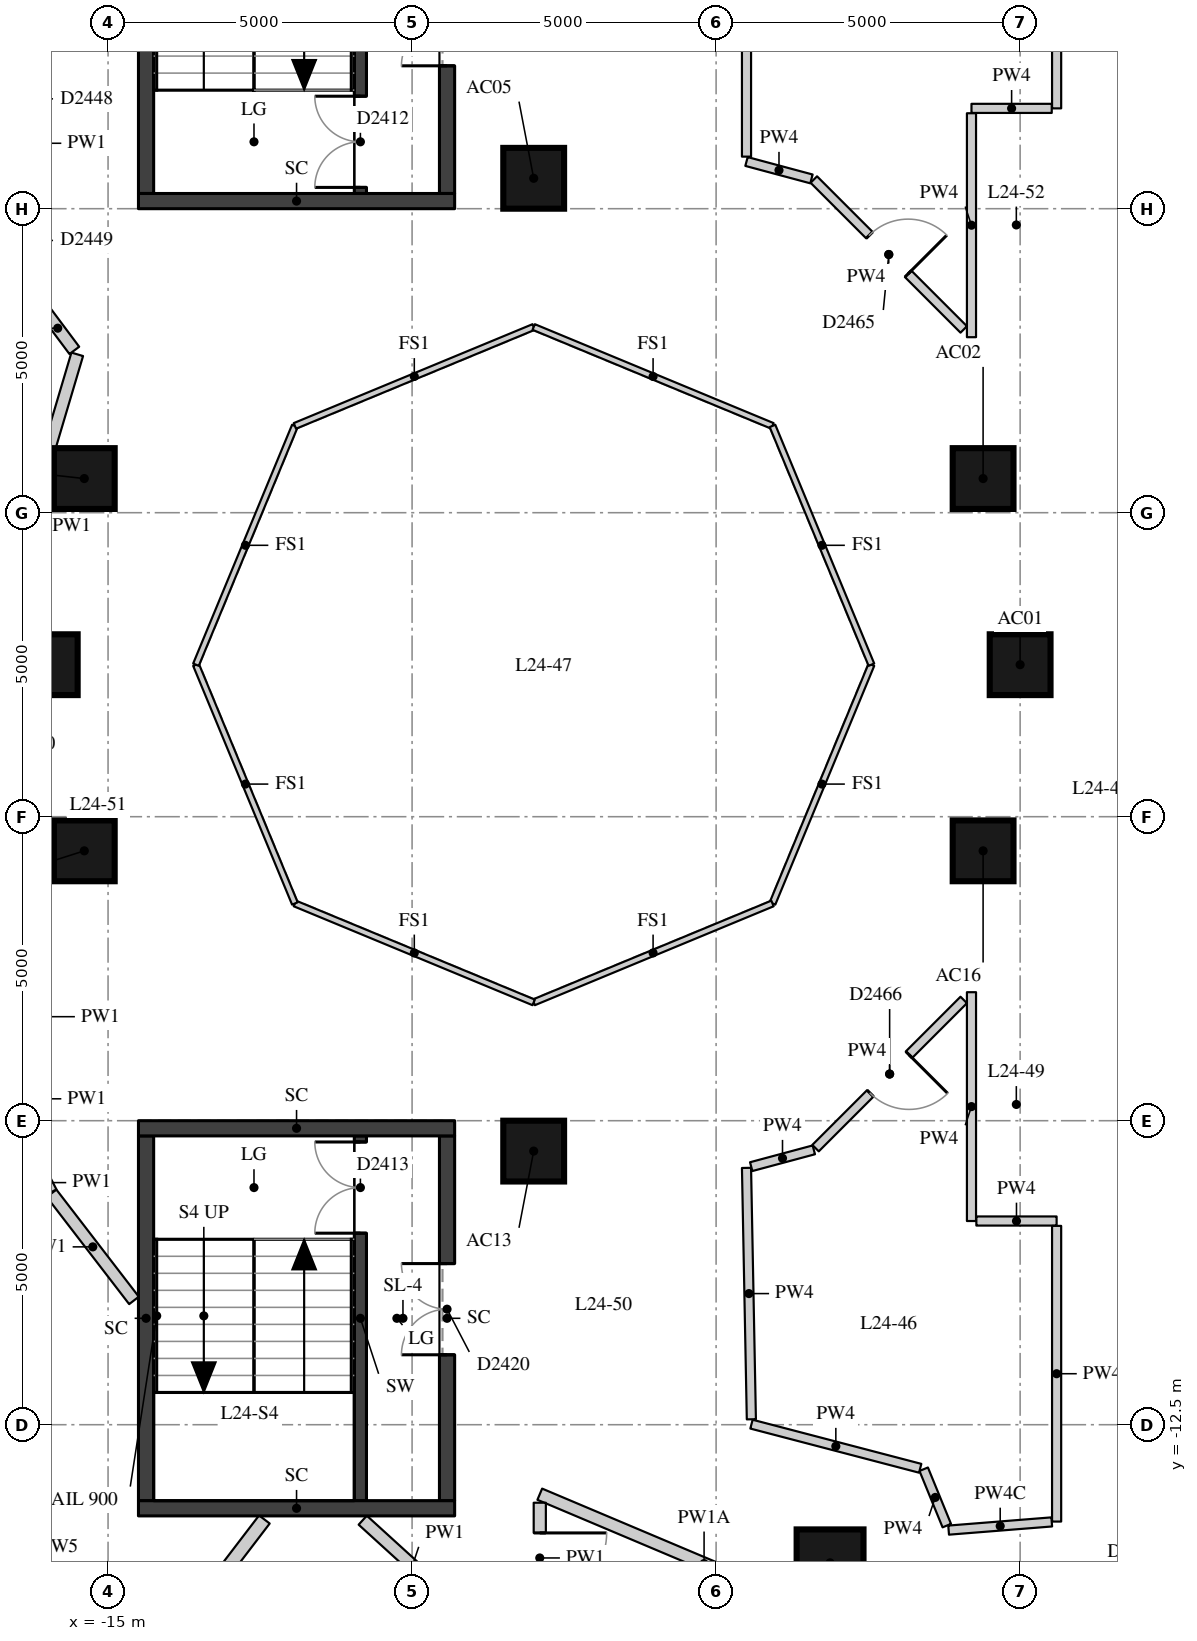
"""IFC4 building model, lengths in metres.
Left out: names, types, materials, properties, quantities, classifications, styles, units other than length and angle.
Written with IfcOpenShell. Run it as: python <this file> out.ifc"""

import sys

from ifc_helpers import new_model, si_unit, direction, frame, frame_2d, origin, origin_2d, place, context, subcontext, project, spatial, rectangle, extrude, element, fill, save


model = new_model("IFC4")
c1 = context("Model", 3, precision=1e-05, world=origin(), true_north=direction((0.0, 1.0)))
c2 = subcontext(c1, "Body", "Model", "MODEL_VIEW")
j1 = project(units=[si_unit("LENGTHUNIT", "METRE"), si_unit("PLANEANGLEUNIT", "RADIAN")], contexts=[c1])
p1 = place(None, origin())
s1 = spatial("IfcSite", under=j1, at=p1, CompositionType="ELEMENT")
p2 = place(p1, origin())
s2 = spatial("IfcBuilding", under=s1, at=p2, CompositionType="ELEMENT")
p3 = place(p2, frame((0.0, 0.0, 88.9)))
s3 = spatial("IfcBuildingStorey", under=s2, at=p3, CompositionType="ELEMENT", Elevation=88.9)
for number, where, z_axis, x_axis in (
    (1, (0.0, 0.0, 0.0), (0.0, 0.0, 1.0), (1.0, 0.0, 0.0)),
    (2, (-0.609, 3.062, 0.0), (0.0, 0.0, 1.0), (1.0, 0.0, 0.0)),
    (3, (-8.0, 8.0, 0.0), (0.0, 0.0, 1.0), (1.0, 0.0, 0.0)),
    (4, (-15.391, 3.062, 0.0), (0.0, 0.0, 1.0), (1.0, 0.0, 0.0)),
    (5, (-16.0, 0.0, 0.0), (0.0, 0.0, 1.0), (1.0, 0.0, 0.0)),
    (6, (-15.391, -3.062, 0.0), (0.0, 0.0, 1.0), (1.0, 0.0, 0.0)),
    (7, (-8.0, -8.0, 0.0), (0.0, 0.0, 1.0), (1.0, 0.0, 0.0)),
    (8, (-0.609, -3.062, 0.0), (0.0, 0.0, 1.0), (1.0, 0.0, 0.0)),
):
    element("IfcColumn", number, at=place(p3, frame(where, z_axis=z_axis, x_axis=x_axis)), inside=s3, PredefinedType="COLUMN", context=c2, shape_type="SweptSolid", body=[
        extrude(rectangle(XDim=1.0, YDim=1.0, at=origin_2d()), origin(), (0.0, 0.0, 1.0), 3.3),
    ])
p4 = place(p3, frame((-3.126, -14.772, 0.0), z_axis=(0.0, 0.0, 1.0), x_axis=(1.0, 0.0, 0.0)))
e9 = element("IfcColumn", 9, at=p4, inside=s3, PredefinedType="COLUMN", context=c2, shape_type="SweptSolid", body=[
    extrude(rectangle(XDim=1.1, YDim=1.1, at=origin_2d()), origin(), (0.0, 0.0, 1.0), 3.3),
])
p5 = place(p3, frame((-17.814, -14.491, 0.0), z_axis=(0.0, 0.0, 1.0), x_axis=(0.73951517403, -0.673139886933, 0.0)))
e10 = element("IfcWall", 10, at=p5, inside=s3, PredefinedType="SOLIDWALL", context=c2, shape_type="SweptSolid", body=[
    extrude(rectangle(XDim=4.031, YDim=0.45, at=frame_2d((2.016, 0.0))), origin(), (0.0, 0.0, 1.0), 3.02),
])
p6 = place(p5, frame((0.941, 0.0, 0.4)))
e11 = element("IfcOpeningElement", 11, at=p6, cuts=e10, PredefinedType="OPENING", context=c2, shape_type="SweptSolid", body=[
    extrude(rectangle(XDim=1.0, YDim=1.75, at=frame_2d((0.5, 0.875))), frame((0.0, 0.235, 0.0), z_axis=(0.0, -1.0, 0.0), x_axis=(1.0, 0.0, 0.0)), (0.0, 0.0, 1.0), 0.47),
])
p7 = place(p5, frame((2.091, 0.0, 0.0)))
e12 = element("IfcOpeningElement", 12, at=p7, cuts=e10, PredefinedType="OPENING", context=c2, shape_type="SweptSolid", body=[
    extrude(rectangle(XDim=1.0, YDim=2.15, at=frame_2d((0.5, 1.075))), frame((0.0, 0.235, 0.0), z_axis=(0.0, -1.0, 0.0), x_axis=(1.0, 0.0, 0.0)), (0.0, 0.0, 1.0), 0.47),
])
p8 = place(p3, frame((-10.85, 7.75, 0.0), z_axis=(0.0, 0.0, 1.0), x_axis=(0.0, 1.0, 0.0)))
e13 = element("IfcWall", 13, at=p8, inside=s3, PredefinedType="SHEAR", context=c2, shape_type="SweptSolid", body=[
    extrude(rectangle(XDim=6.0, YDim=0.2, at=frame_2d((3.0, 0.0))), origin(), (0.0, 0.0, 1.0), 3.02),
])
p9 = place(p8, frame((0.1, 0.0, 0.0)))
e14 = element("IfcOpeningElement", 14, at=p9, cuts=e13, PredefinedType="OPENING", context=c2, shape_type="SweptSolid", body=[
    extrude(rectangle(XDim=1.5, YDim=2.1, at=frame_2d((0.75, 1.05))), frame((0.0, 0.11, 0.0), z_axis=(0.0, -1.0, 0.0), x_axis=(1.0, 0.0, 0.0)), (0.0, 0.0, 1.0), 0.22),
])
p10 = place(p3, frame((-10.85, -13.75, 0.0), z_axis=(0.0, 0.0, 1.0), x_axis=(0.0, 1.0, 0.0)))
e15 = element("IfcWall", 15, at=p10, inside=s3, PredefinedType="SHEAR", context=c2, shape_type="SweptSolid", body=[
    extrude(rectangle(XDim=6.0, YDim=0.2, at=frame_2d((3.0, 0.0))), origin(), (0.0, 0.0, 1.0), 3.02),
])
p11 = place(p10, frame((4.4, 0.0, 0.0)))
e16 = element("IfcOpeningElement", 16, at=p11, cuts=e15, PredefinedType="OPENING", context=c2, shape_type="SweptSolid", body=[
    extrude(rectangle(XDim=1.5, YDim=2.1, at=frame_2d((0.75, 1.05))), frame((0.0, 0.11, 0.0), z_axis=(0.0, -1.0, 0.0), x_axis=(1.0, 0.0, 0.0)), (0.0, 0.0, 1.0), 0.22),
])
p12 = place(p3, frame((-14.375, 7.75, -0.28), z_axis=(0.0, 0.0, 1.0), x_axis=(0.0, 1.0, 0.0)))
e17 = element("IfcWall", 17, at=p12, inside=s3, PredefinedType="SHEAR", context=c2, shape_type="SweptSolid", body=[
    extrude(rectangle(XDim=6.0, YDim=0.25, at=frame_2d((3.0, 0.0))), origin(), (0.0, 0.0, 1.0), 3.3),
])
p13 = place(p3, frame((-9.425, 7.75, -0.28), z_axis=(0.0, 0.0, 1.0), x_axis=(0.0, 1.0, 0.0)))
e18 = element("IfcWall", 18, at=p13, inside=s3, PredefinedType="SHEAR", context=c2, shape_type="SweptSolid", body=[
    extrude(rectangle(XDim=6.0, YDim=0.25, at=frame_2d((3.0, 0.0))), origin(), (0.0, 0.0, 1.0), 3.3),
])
p14 = place(p13, frame((2.1, 0.0, 0.28)))
e19 = element("IfcOpeningElement", 19, at=p14, cuts=e18, PredefinedType="OPENING", context=c2, shape_type="SweptSolid", body=[
    extrude(rectangle(XDim=1.5, YDim=2.1, at=frame_2d((0.75, 1.05))), frame((0.0, 0.135, 0.0), z_axis=(0.0, -1.0, 0.0), x_axis=(1.0, 0.0, 0.0)), (0.0, 0.0, 1.0), 0.27),
])
p15 = place(p3, frame((-14.5, 7.625, -0.28), z_axis=(0.0, 0.0, 1.0), x_axis=(1.0, 0.0, 0.0)))
e20 = element("IfcWall", 20, at=p15, inside=s3, PredefinedType="SHEAR", context=c2, shape_type="SweptSolid", body=[
    extrude(rectangle(XDim=5.2, YDim=0.25, at=frame_2d((2.6, 0.0))), origin(), (0.0, 0.0, 1.0), 3.3),
])
p16 = place(p3, frame((-14.375, -13.75, -0.28), z_axis=(0.0, 0.0, 1.0), x_axis=(0.0, 1.0, 0.0)))
e21 = element("IfcWall", 21, at=p16, inside=s3, PredefinedType="SHEAR", context=c2, shape_type="SweptSolid", body=[
    extrude(rectangle(XDim=6.0, YDim=0.25, at=frame_2d((3.0, 0.0))), origin(), (0.0, 0.0, 1.0), 3.3),
])
p17 = place(p3, frame((-9.425, -13.75, -0.28), z_axis=(0.0, 0.0, 1.0), x_axis=(0.0, 1.0, 0.0)))
e22 = element("IfcWall", 22, at=p17, inside=s3, PredefinedType="SHEAR", context=c2, shape_type="SweptSolid", body=[
    extrude(rectangle(XDim=6.0, YDim=0.25, at=frame_2d((3.0, 0.0))), origin(), (0.0, 0.0, 1.0), 3.3),
])
p18 = place(p17, frame((2.4, 0.0, 0.28)))
e23 = element("IfcOpeningElement", 23, at=p18, cuts=e22, PredefinedType="OPENING", context=c2, shape_type="SweptSolid", body=[
    extrude(rectangle(XDim=1.5, YDim=2.1, at=frame_2d((0.75, 1.05))), frame((0.0, 0.135, 0.0), z_axis=(0.0, -1.0, 0.0), x_axis=(1.0, 0.0, 0.0)), (0.0, 0.0, 1.0), 0.27),
])
for number, where, z_axis, x_axis in (
    (24, (-14.5, -7.625, -0.28), (0.0, 0.0, 1.0), (1.0, 0.0, 0.0)),
    (25, (-14.5, -13.875, -0.28), (0.0, 0.0, 1.0), (1.0, 0.0, 0.0)),
):
    element("IfcWall", number, at=place(p3, frame(where, z_axis=z_axis, x_axis=x_axis)), inside=s3, PredefinedType="SHEAR", context=c2, shape_type="SweptSolid", body=[
        extrude(rectangle(XDim=5.2, YDim=0.25, at=frame_2d((2.6, 0.0))), origin(), (0.0, 0.0, 1.0), 3.3),
    ])
p19 = place(p3, frame((-14.573, -10.456, 0.0), z_axis=(0.0, 0.0, 1.0), x_axis=(-0.60967360535, 0.792652568872, 0.0)))
e26 = element("IfcWall", 26, at=p19, inside=s3, PredefinedType="PARTITIONING", context=c2, shape_type="SweptSolid", body=[
    extrude(rectangle(XDim=2.223, YDim=0.2, at=frame_2d((1.111, 0.0))), origin(), (0.0, 0.0, 1.0), 3.02),
])
p20 = place(p3, frame((-15.938, -8.676, 0.0), z_axis=(0.0, 0.0, 1.0), x_axis=(-0.456525695549, 0.889710227717, 0.0)))
e27 = element("IfcWall", 27, at=p20, inside=s3, PredefinedType="PARTITIONING", context=c2, shape_type="SweptSolid", body=[
    extrude(rectangle(XDim=0.356, YDim=0.2, at=frame_2d((0.178, 0.0))), origin(), (0.0, 0.0, 1.0), 3.02),
])
p21 = place(p3, frame((-17.189, -0.562, 0.0), z_axis=(0.0, 0.0, 1.0), x_axis=(0.28454253649, 0.95866341587, 0.0)))
e28 = element("IfcWall", 28, at=p21, inside=s3, PredefinedType="PARTITIONING", context=c2, shape_type="SweptSolid", body=[
    extrude(rectangle(XDim=5.911, YDim=0.2, at=frame_2d((2.956, 0.0))), origin(), (0.0, 0.0, 1.0), 3.02),
])
p22 = place(p3, frame((-15.555, 5.169, 0.0), z_axis=(0.0, 0.0, 1.0), x_axis=(-0.598284647233, 0.801283645712, 0.0)))
e29 = element("IfcWall", 29, at=p22, inside=s3, PredefinedType="PARTITIONING", context=c2, shape_type="SweptSolid", body=[
    extrude(rectangle(XDim=0.912, YDim=0.2, at=frame_2d((0.456, 0.0))), origin(), (0.0, 0.0, 1.0), 3.02),
])
p23 = place(p3, frame((-2.496, -15.925, 0.0), z_axis=(0.0, 0.0, 1.0), x_axis=(-0.921239287596, 0.388996368864, 0.0)))
e30 = element("IfcWall", 30, at=p23, inside=s3, PredefinedType="PARTITIONING", context=c2, shape_type="SweptSolid", body=[
    extrude(rectangle(XDim=5.866, YDim=0.2, at=frame_2d((2.933, 0.0))), origin(), (0.0, 0.0, 1.0), 2.57),
])
p24 = place(p3, frame((-7.9, -13.783, 0.0), z_axis=(0.0, 0.0, 1.0), x_axis=(0.0, -1.0, 0.0)))
e31 = element("IfcWall", 31, at=p24, inside=s3, PredefinedType="PARTITIONING", context=c2, shape_type="SweptSolid", body=[
    extrude(rectangle(XDim=1.817, YDim=0.2, at=frame_2d((0.908, 0.0))), origin(), (0.0, 0.0, 1.0), 3.02),
])
p25 = place(p24, frame((0.497, 0.0, 0.0)))
e32 = element("IfcOpeningElement", 32, at=p25, cuts=e31, PredefinedType="OPENING", context=c2, shape_type="SweptSolid", body=[
    extrude(rectangle(XDim=1.1, YDim=2.1, at=frame_2d((0.55, 1.05))), frame((0.0, 0.11, 0.0), z_axis=(0.0, -1.0, 0.0), x_axis=(1.0, 0.0, 0.0)), (0.0, 0.0, 1.0), 0.22),
])
p26 = place(p3, frame((-9.176, -15.56, 0.0), z_axis=(0.0, 0.0, 1.0), x_axis=(-0.73943556447, 0.673227336044, 0.0)))
e33 = element("IfcWall", 33, at=p26, inside=s3, PredefinedType="PARTITIONING", context=c2, shape_type="SweptSolid", body=[
    extrude(rectangle(XDim=2.212, YDim=0.2, at=frame_2d((1.106, 0.0))), origin(), (0.0, 0.0, 1.0), 3.02),
])
p27 = place(p3, frame((0.6, 13.205, 0.0), z_axis=(0.0, 0.0, 1.0), x_axis=(0.0, -1.0, 0.0)))
e34 = element("IfcWall", 34, at=p27, inside=s3, PredefinedType="PARTITIONING", context=c2, shape_type="SweptSolid", body=[
    extrude(rectangle(XDim=4.055, YDim=0.15, at=frame_2d((2.027, 0.0))), origin(), (0.0, 0.0, 1.0), 3.02),
])
p28 = place(p3, frame((0.52, 9.15, 0.0), z_axis=(0.0, 0.0, 1.0), x_axis=(-1.0, 0.0, 0.0)))
e35 = element("IfcWall", 35, at=p28, inside=s3, PredefinedType="PARTITIONING", context=c2, shape_type="SweptSolid", body=[
    extrude(rectangle(XDim=1.32, YDim=0.15, at=frame_2d((0.66, 0.0))), origin(), (0.0, 0.0, 1.0), 3.02),
])
p29 = place(p3, frame((-0.8, 9.07, 0.0), z_axis=(0.0, 0.0, 1.0), x_axis=(0.0, -1.0, 0.0)))
e36 = element("IfcWall", 36, at=p29, inside=s3, PredefinedType="PARTITIONING", context=c2, shape_type="SweptSolid", body=[
    extrude(rectangle(XDim=3.683, YDim=0.15, at=frame_2d((1.842, 0.0))), origin(), (0.0, 0.0, 1.0), 3.02),
])
p30 = place(p3, frame((-0.927, 5.514, 0.0), z_axis=(0.0, 0.0, 1.0), x_axis=(-0.707106781187, 0.707106781187, 0.0)))
e37 = element("IfcWall", 37, at=p30, inside=s3, PredefinedType="PARTITIONING", context=c2, shape_type="SweptSolid", body=[
    extrude(rectangle(XDim=3.487, YDim=0.15, at=frame_2d((1.743, 0.0))), origin(), (0.0, 0.0, 1.0), 3.02),
])
p31 = place(p30, frame((1.293, 0.0, 0.0)))
e38 = element("IfcOpeningElement", 38, at=p31, cuts=e37, PredefinedType="OPENING", context=c2, shape_type="SweptSolid", body=[
    extrude(rectangle(XDim=0.9, YDim=2.1, at=frame_2d((0.45, 1.05))), frame((0.0, 0.085, 0.0), z_axis=(0.0, -1.0, 0.0), x_axis=(1.0, 0.0, 0.0)), (0.0, 0.0, 1.0), 0.17),
])
p32 = place(p3, frame((-3.432, 7.99, 0.0), z_axis=(0.0, 0.0, 1.0), x_axis=(-0.965900750832, 0.258912609855, 0.0)))
e39 = element("IfcWall", 39, at=p32, inside=s3, PredefinedType="PARTITIONING", context=c2, shape_type="SweptSolid", body=[
    extrude(rectangle(XDim=1.106, YDim=0.15, at=frame_2d((0.553, 0.0))), origin(), (0.0, 0.0, 1.0), 3.02),
])
p33 = place(p3, frame((-4.5, 8.356, 0.0), z_axis=(0.0, 0.0, 1.0), x_axis=(0.0, 1.0, 0.0)))
e40 = element("IfcWall", 40, at=p33, inside=s3, PredefinedType="PARTITIONING", context=c2, shape_type="SweptSolid", body=[
    extrude(rectangle(XDim=3.631, YDim=0.15, at=frame_2d((1.815, 0.0))), origin(), (0.0, 0.0, 1.0), 3.02),
])
p34 = place(p3, frame((-0.8, -5.386, 0.0), z_axis=(0.0, 0.0, 1.0), x_axis=(0.0, -1.0, 0.0)))
e41 = element("IfcWall", 41, at=p34, inside=s3, PredefinedType="PARTITIONING", context=c2, shape_type="SweptSolid", body=[
    extrude(rectangle(XDim=3.763, YDim=0.15, at=frame_2d((1.882, 0.0))), origin(), (0.0, 0.0, 1.0), 3.02),
])
p35 = place(p3, frame((-0.72, -9.15, 0.0), z_axis=(0.0, 0.0, 1.0), x_axis=(1.0, 0.0, 0.0)))
e42 = element("IfcWall", 42, at=p35, inside=s3, PredefinedType="PARTITIONING", context=c2, shape_type="SweptSolid", body=[
    extrude(rectangle(XDim=1.32, YDim=0.15, at=frame_2d((0.66, 0.0))), origin(), (0.0, 0.0, 1.0), 3.02),
])
p36 = place(p3, frame((0.6, -9.23, 0.0), z_axis=(0.0, 0.0, 1.0), x_axis=(0.0, -1.0, 0.0)))
e43 = element("IfcWall", 43, at=p36, inside=s3, PredefinedType="PARTITIONING", context=c2, shape_type="SweptSolid", body=[
    extrude(rectangle(XDim=4.863, YDim=0.15, at=frame_2d((2.432, 0.0))), origin(), (0.0, 0.0, 1.0), 3.02),
])
p37 = place(p3, frame((0.52, -14.099, 0.0), z_axis=(0.0, 0.0, 1.0), x_axis=(-0.99684577893, -0.079363045745, 0.0)))
e44 = element("IfcWall", 44, at=p37, inside=s3, PredefinedType="PARTITIONING", context=c2, shape_type="SweptSolid", body=[
    extrude(rectangle(XDim=1.701, YDim=0.15, at=frame_2d((0.851, 0.0))), origin(), (0.0, 0.0, 1.0), 2.42),
])
p38 = place(p3, frame((-1.206, -14.16, 0.0), z_axis=(0.0, 0.0, 1.0), x_axis=(-0.378813066595, 0.925473209, 0.0)))
e45 = element("IfcWall", 45, at=p38, inside=s3, PredefinedType="PARTITIONING", context=c2, shape_type="SweptSolid", body=[
    extrude(rectangle(XDim=1.002, YDim=0.15, at=frame_2d((0.501, 0.0))), origin(), (0.0, 0.0, 1.0), 3.02),
])
p39 = place(p3, frame((-1.644, -13.217, 0.0), z_axis=(0.0, 0.0, 1.0), x_axis=(-0.967446197993, 0.253076774891, 0.0)))
e46 = element("IfcWall", 46, at=p39, inside=s3, PredefinedType="PARTITIONING", context=c2, shape_type="SweptSolid", body=[
    extrude(rectangle(XDim=2.868, YDim=0.15, at=frame_2d((1.434, 0.0))), origin(), (0.0, 0.0, 1.0), 3.02),
])
p40 = place(p3, frame((-4.42, -12.411, 0.0), z_axis=(0.0, 0.0, 1.0), x_axis=(-0.01930438501, 0.999813652997, 0.0)))
e47 = element("IfcWall", 47, at=p40, inside=s3, PredefinedType="PARTITIONING", context=c2, shape_type="SweptSolid", body=[
    extrude(rectangle(XDim=4.135, YDim=0.15, at=frame_2d((2.068, 0.0))), origin(), (0.0, 0.0, 1.0), 3.02),
])
p41 = place(p3, frame((-4.423, -8.256, 0.0), z_axis=(0.0, 0.0, 1.0), x_axis=(0.965880568435, 0.258987890683, 0.0)))
e48 = element("IfcWall", 48, at=p41, inside=s3, PredefinedType="PARTITIONING", context=c2, shape_type="SweptSolid", body=[
    extrude(rectangle(XDim=1.066, YDim=0.15, at=frame_2d((0.533, 0.0))), origin(), (0.0, 0.0, 1.0), 3.02),
])
p42 = place(p3, frame((-3.365, -7.951, 0.0), z_axis=(0.0, 0.0, 1.0), x_axis=(0.707106781187, 0.707106781187, 0.0)))
e49 = element("IfcWall", 49, at=p42, inside=s3, PredefinedType="PARTITIONING", context=c2, shape_type="SweptSolid", body=[
    extrude(rectangle(XDim=3.447, YDim=0.15, at=frame_2d((1.723, 0.0))), origin(), (0.0, 0.0, 1.0), 3.02),
])
p43 = place(p42, frame((1.273, 0.0, 0.0)))
e50 = element("IfcOpeningElement", 50, at=p43, cuts=e49, PredefinedType="OPENING", context=c2, shape_type="SweptSolid", body=[
    extrude(rectangle(XDim=0.9, YDim=2.1, at=frame_2d((0.45, 1.05))), frame((0.0, 0.085, 0.0), z_axis=(0.0, -1.0, 0.0), x_axis=(1.0, 0.0, 0.0)), (0.0, 0.0, 1.0), 0.17),
])
p44 = place(p3, frame((-14.696, -17.025, 0.0), z_axis=(0.0, 0.0, 1.0), x_axis=(0.607059278405, 0.794656550028, 0.0)))
e51 = element("IfcWall", 51, at=p44, inside=s3, PredefinedType="PARTITIONING", context=c2, shape_type="SweptSolid", body=[
    extrude(rectangle(XDim=3.734, YDim=0.22, at=frame_2d((1.867, 0.0))), origin(), (0.0, 0.0, 1.0), 2.57),
])
for number, where, z_axis, x_axis in (
    (52, (-2.446, 0.0, 0.0), (0.0, 0.0, 1.0), (-0.383, -0.924, 0.0)),
    (53, (-4.073, -3.927, 0.0), (0.0, 0.0, 1.0), (-0.924, -0.383, 0.0)),
    (54, (-8.0, -5.554, 0.0), (0.0, 0.0, 1.0), (-0.924, 0.383, 0.0)),
    (55, (-11.927, -3.927, 0.0), (0.0, 0.0, 1.0), (-0.383, 0.924, 0.0)),
    (56, (-13.554, 0.0, 0.0), (0.0, 0.0, 1.0), (0.383, 0.924, 0.0)),
    (57, (-11.927, 3.927, 0.0), (0.0, 0.0, 1.0), (0.924, 0.383, 0.0)),
    (58, (-8.0, 5.554, 0.0), (0.0, 0.0, 1.0), (0.924, -0.383, 0.0)),
    (59, (-4.073, 3.927, 0.0), (0.0, 0.0, 1.0), (0.383, -0.924, 0.0)),
):
    element("IfcWall", number, at=place(p3, frame(where, z_axis=z_axis, x_axis=x_axis)), inside=s3, PredefinedType="PARTITIONING", context=c2, shape_type="SweptSolid", body=[
        extrude(rectangle(XDim=4.251, YDim=0.1, at=frame_2d((2.125, 0.0))), origin(), (0.0, 0.0, 1.0), 3.02),
    ])
p45 = place(p9, origin())
e60 = element("IfcDoor", 60, at=p45, inside=s3, OperationType="DOUBLE_DOOR_SINGLE_SWING", PredefinedType="DOOR", context=c2, shape_type="SweptSolid", body=[
    extrude(rectangle(XDim=1.5, YDim=2.1, at=frame_2d((0.75, 1.05))), frame((0.0, 0.025, 0.0), z_axis=(0.0, -1.0, 0.0), x_axis=(1.0, 0.0, 0.0)), (0.0, 0.0, 1.0), 0.05),
])
fill(e14, e60)
p46 = place(p11, origin())
e61 = element("IfcDoor", 61, at=p46, inside=s3, OperationType="DOUBLE_DOOR_SINGLE_SWING", PredefinedType="DOOR", context=c2, shape_type="SweptSolid", body=[
    extrude(rectangle(XDim=1.5, YDim=2.1, at=frame_2d((0.75, 1.05))), frame((0.0, 0.025, 0.0), z_axis=(0.0, -1.0, 0.0), x_axis=(1.0, 0.0, 0.0)), (0.0, 0.0, 1.0), 0.05),
])
fill(e16, e61)
p47 = place(p14, origin())
e62 = element("IfcDoor", 62, at=p47, inside=s3, OperationType="DOUBLE_DOOR_SINGLE_SWING", PredefinedType="DOOR", context=c2, shape_type="SweptSolid", body=[
    extrude(rectangle(XDim=1.5, YDim=2.1, at=frame_2d((0.75, 1.05))), frame((0.0, 0.025, 0.0), z_axis=(0.0, -1.0, 0.0), x_axis=(1.0, 0.0, 0.0)), (0.0, 0.0, 1.0), 0.05),
])
fill(e19, e62)
p48 = place(p18, origin())
e63 = element("IfcDoor", 63, at=p48, inside=s3, OperationType="DOUBLE_DOOR_SINGLE_SWING", PredefinedType="DOOR", context=c2, shape_type="SweptSolid", body=[
    extrude(rectangle(XDim=1.5, YDim=2.1, at=frame_2d((0.75, 1.05))), frame((0.0, 0.025, 0.0), z_axis=(0.0, -1.0, 0.0), x_axis=(1.0, 0.0, 0.0)), (0.0, 0.0, 1.0), 0.05),
])
fill(e23, e63)
p49 = place(p25, origin())
e64 = element("IfcDoor", 64, at=p49, inside=s3, OperationType="SINGLE_SWING_LEFT", PredefinedType="DOOR", context=c2, shape_type="SweptSolid", body=[
    extrude(rectangle(XDim=1.1, YDim=2.1, at=frame_2d((0.55, 1.05))), frame((0.0, 0.025, 0.0), z_axis=(0.0, -1.0, 0.0), x_axis=(1.0, 0.0, 0.0)), (0.0, 0.0, 1.0), 0.05),
])
fill(e32, e64)
p50 = place(p31, origin())
e65 = element("IfcDoor", 65, at=p50, inside=s3, OperationType="SINGLE_SWING_RIGHT", PredefinedType="DOOR", context=c2, shape_type="SweptSolid", body=[
    extrude(rectangle(XDim=0.9, YDim=2.1, at=frame_2d((0.45, 1.05))), frame((0.0, 0.025, 0.0), z_axis=(0.0, -1.0, 0.0), x_axis=(1.0, 0.0, 0.0)), (0.0, 0.0, 1.0), 0.05),
])
fill(e38, e65)
p51 = place(p43, origin())
e66 = element("IfcDoor", 66, at=p51, inside=s3, OperationType="SINGLE_SWING_LEFT", PredefinedType="DOOR", context=c2, shape_type="SweptSolid", body=[
    extrude(rectangle(XDim=0.9, YDim=2.1, at=frame_2d((0.45, 1.05))), frame((0.0, 0.025, 0.0), z_axis=(0.0, -1.0, 0.0), x_axis=(1.0, 0.0, 0.0)), (0.0, 0.0, 1.0), 0.05),
])
fill(e50, e66)
save(model, sys.argv[1])
